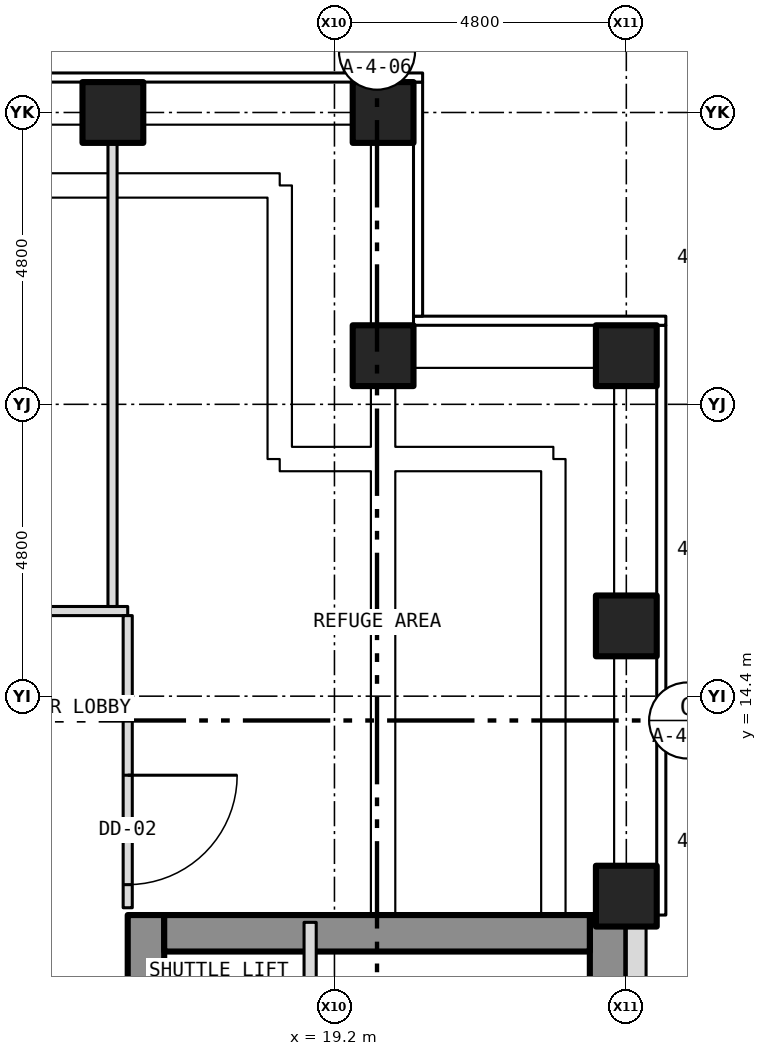
"""IFC4 building model, lengths in metres.
Left out: names, types, materials, properties, quantities, classifications, styles, units other than length and angle.
Written with IfcOpenShell. Run it as: python <this file> out.ifc"""

import sys

from ifc_helpers import new_model, si_unit, direction, frame, frame_2d, origin, origin_2d, place, context, subcontext, project, spatial, rectangle, hollow_rectangle, extrude, element, fill, save


model = new_model("IFC4")
c1 = context("Model", 3, precision=1e-05, world=origin(), true_north=direction((0.0, 1.0)))
c2 = subcontext(c1, "Body", "Model", "MODEL_VIEW")
j1 = project(units=[si_unit("LENGTHUNIT", "METRE"), si_unit("PLANEANGLEUNIT", "RADIAN")], contexts=[c1])
p1 = place(None, origin())
s1 = spatial("IfcSite", under=j1, at=p1, CompositionType="ELEMENT")
p2 = place(p1, origin())
s2 = spatial("IfcBuilding", under=s1, at=p2, CompositionType="ELEMENT")
p3 = place(p2, frame((0.0, 0.0, 84.5)))
s3 = spatial("IfcBuildingStorey", under=s2, at=p3, CompositionType="ELEMENT", Elevation=84.5)
for number, where, z_axis, x_axis in (
    (1, (15.556, 24.0, -0.3), (0.0, 0.0, 1.0), (1.0, 0.0, 0.0)),
    (2, (20.0, 24.0, -0.3), (0.0, 0.0, 1.0), (1.0, 0.0, 0.0)),
    (3, (24.0, 11.111, -0.3), (0.0, 0.0, 1.0), (1.0, 0.0, 0.0)),
    (4, (24.0, 15.556, -0.3), (0.0, 0.0, 1.0), (1.0, 0.0, 0.0)),
    (5, (24.0, 20.0, -0.3), (0.0, 0.0, 1.0), (1.0, 0.0, 0.0)),
    (6, (20.0, 20.0, -0.3), (0.0, 0.0, 1.0), (1.0, 0.0, 0.0)),
):
    element("IfcColumn", number, at=place(p3, frame(where, z_axis=z_axis, x_axis=x_axis)), inside=s3, PredefinedType="COLUMN", context=c2, shape_type="SweptSolid", body=[
        extrude(hollow_rectangle(XDim=1.0, YDim=1.0, WallThickness=0.06, at=origin_2d()), origin(), (0.0, 0.0, 1.0), 4.65),
    ])
p4 = place(p3, frame((16.1, -10.8, 0.0), z_axis=(0.0, 0.0, 1.0), x_axis=(0.0, 1.0, 0.0)))
e7 = element("IfcWall", 7, at=p4, inside=s3, PredefinedType="SHEAR", context=c2, shape_type="SweptSolid", body=[
    extrude(rectangle(XDim=21.6, YDim=0.6, at=frame_2d((10.8, 0.0))), origin(), (0.0, 0.0, 1.0), 3.9),
])
p5 = place(p4, frame((9.4, 0.0, 0.0)))
e8 = element("IfcOpeningElement", 8, at=p5, cuts=e7, PredefinedType="OPENING", context=c2, shape_type="SweptSolid", body=[
    extrude(rectangle(XDim=1.1, YDim=2.1, at=frame_2d((0.55, 1.05))), frame((0.0, 0.312, 0.0), z_axis=(0.0, -1.0, 0.0), x_axis=(1.0, 0.0, 0.0)), (0.0, 0.0, 1.0), 0.624),
])
p6 = place(p4, frame((11.5, 0.0, 0.0)))
e9 = element("IfcOpeningElement", 9, at=p6, cuts=e7, PredefinedType="OPENING", context=c2, shape_type="SweptSolid", body=[
    extrude(rectangle(XDim=1.1, YDim=2.1, at=frame_2d((0.55, 1.05))), frame((0.0, 0.312, 0.0), z_axis=(0.0, -1.0, 0.0), x_axis=(1.0, 0.0, 0.0)), (0.0, 0.0, 1.0), 0.624),
])
p7 = place(p4, frame((13.6, 0.0, 0.0)))
e10 = element("IfcOpeningElement", 10, at=p7, cuts=e7, PredefinedType="OPENING", context=c2, shape_type="SweptSolid", body=[
    extrude(rectangle(XDim=1.1, YDim=2.1, at=frame_2d((0.55, 1.05))), frame((0.0, 0.312, 0.0), z_axis=(0.0, -1.0, 0.0), x_axis=(1.0, 0.0, 0.0)), (0.0, 0.0, 1.0), 0.624),
])
p8 = place(p4, frame((15.7, 0.0, 0.0)))
e11 = element("IfcOpeningElement", 11, at=p8, cuts=e7, PredefinedType="OPENING", context=c2, shape_type="SweptSolid", body=[
    extrude(rectangle(XDim=1.1, YDim=2.1, at=frame_2d((0.55, 1.05))), frame((0.0, 0.312, 0.0), z_axis=(0.0, -1.0, 0.0), x_axis=(1.0, 0.0, 0.0)), (0.0, 0.0, 1.0), 0.624),
])
p9 = place(p4, frame((17.8, 0.0, 0.0)))
e12 = element("IfcOpeningElement", 12, at=p9, cuts=e7, PredefinedType="OPENING", context=c2, shape_type="SweptSolid", body=[
    extrude(rectangle(XDim=1.1, YDim=2.1, at=frame_2d((0.55, 1.05))), frame((0.0, 0.312, 0.0), z_axis=(0.0, -1.0, 0.0), x_axis=(1.0, 0.0, 0.0)), (0.0, 0.0, 1.0), 0.624),
])
p10 = place(p4, frame((5.642, 0.0, 0.0)))
e13 = element("IfcOpeningElement", 13, at=p10, cuts=e7, PredefinedType="OPENING", context=c2, shape_type="SweptSolid", body=[
    extrude(rectangle(XDim=1.1, YDim=2.1, at=frame_2d((0.55, 1.05))), frame((0.0, 0.312, 0.0), z_axis=(0.0, -1.0, 0.0), x_axis=(1.0, 0.0, 0.0)), (0.0, 0.0, 1.0), 0.624),
])
p11 = place(p4, frame((7.5, 0.0, 0.0)))
e14 = element("IfcOpeningElement", 14, at=p11, cuts=e7, PredefinedType="OPENING", context=c2, shape_type="SweptSolid", body=[
    extrude(rectangle(XDim=1.1, YDim=2.1, at=frame_2d((0.55, 1.05))), frame((0.0, 0.312, 0.0), z_axis=(0.0, -1.0, 0.0), x_axis=(1.0, 0.0, 0.0)), (0.0, 0.0, 1.0), 0.624),
])
p12 = place(p3, frame((23.7, -10.8, 0.0), z_axis=(0.0, 0.0, 1.0), x_axis=(0.0, 1.0, 0.0)))
e15 = element("IfcWall", 15, at=p12, inside=s3, PredefinedType="SHEAR", context=c2, shape_type="SweptSolid", body=[
    extrude(rectangle(XDim=21.6, YDim=0.6, at=frame_2d((10.8, 0.0))), origin(), (0.0, 0.0, 1.0), 3.9),
])
p13 = place(p3, frame((16.4, 10.5, 0.0), z_axis=(0.0, 0.0, 1.0), x_axis=(1.0, 0.0, 0.0)))
e16 = element("IfcWall", 16, at=p13, inside=s3, PredefinedType="SHEAR", context=c2, shape_type="SweptSolid", body=[
    extrude(rectangle(XDim=7.0, YDim=0.6, at=frame_2d((3.5, 0.0))), origin(), (0.0, 0.0, 1.0), 3.9),
])
p14 = place(p3, frame((24.163, -10.8, 0.0), z_axis=(0.0, 0.0, 1.0), x_axis=(0.0, 1.0, 0.0)))
e17 = element("IfcWall", 17, at=p14, inside=s3, PredefinedType="SOLIDWALL", context=c2, shape_type="SweptSolid", body=[
    extrude(rectangle(XDim=21.6, YDim=0.325, at=frame_2d((10.8, 0.0))), origin(), (0.0, 0.0, 1.0), 4.5),
])
p15 = place(p14, frame((3.0, 0.0, 2.2)))
e18 = element("IfcOpeningElement", 18, at=p15, cuts=e17, PredefinedType="OPENING", context=c2, shape_type="SweptSolid", body=[
    extrude(rectangle(XDim=1.2, YDim=0.6, at=frame_2d((0.6, 0.3))), frame((0.0, 0.175, 0.0), z_axis=(0.0, -1.0, 0.0), x_axis=(1.0, 0.0, 0.0)), (0.0, 0.0, 1.0), 0.349),
])
p16 = place(p14, frame((7.8, 0.0, 2.2)))
e19 = element("IfcOpeningElement", 19, at=p16, cuts=e17, PredefinedType="OPENING", context=c2, shape_type="SweptSolid", body=[
    extrude(rectangle(XDim=1.2, YDim=0.6, at=frame_2d((0.6, 0.3))), frame((0.0, 0.175, 0.0), z_axis=(0.0, -1.0, 0.0), x_axis=(1.0, 0.0, 0.0)), (0.0, 0.0, 1.0), 0.349),
])
p17 = place(p14, frame((12.6, 0.0, 2.2)))
e20 = element("IfcOpeningElement", 20, at=p17, cuts=e17, PredefinedType="OPENING", context=c2, shape_type="SweptSolid", body=[
    extrude(rectangle(XDim=1.2, YDim=0.6, at=frame_2d((0.6, 0.3))), frame((0.0, 0.175, 0.0), z_axis=(0.0, -1.0, 0.0), x_axis=(1.0, 0.0, 0.0)), (0.0, 0.0, 1.0), 0.349),
])
p18 = place(p14, frame((17.4, 0.0, 2.2)))
e21 = element("IfcOpeningElement", 21, at=p18, cuts=e17, PredefinedType="OPENING", context=c2, shape_type="SweptSolid", body=[
    extrude(rectangle(XDim=1.2, YDim=0.6, at=frame_2d((0.6, 0.3))), frame((0.0, 0.175, 0.0), z_axis=(0.0, -1.0, 0.0), x_axis=(1.0, 0.0, 0.0)), (0.0, 0.0, 1.0), 0.349),
])
p19 = place(p3, frame((-15.8, 15.8, 0.0), z_axis=(0.0, 0.0, 1.0), x_axis=(1.0, 0.0, 0.0)))
e22 = element("IfcWall", 22, at=p19, inside=s3, PredefinedType="PARTITIONING", context=c2, shape_type="SweptSolid", body=[
    extrude(rectangle(XDim=31.6, YDim=0.15, at=frame_2d((15.8, 0.0))), origin(), (0.0, 0.0, 1.0), 4.35),
])
p20 = place(p19, frame((4.98, 0.0, 0.0)))
e23 = element("IfcOpeningElement", 23, at=p20, cuts=e22, PredefinedType="OPENING", context=c2, shape_type="SweptSolid", body=[
    extrude(rectangle(XDim=0.9, YDim=2.1, at=frame_2d((0.45, 1.05))), frame((0.0, 0.087, 0.0), z_axis=(0.0, -1.0, 0.0), x_axis=(1.0, 0.0, 0.0)), (0.0, 0.0, 1.0), 0.174),
])
p21 = place(p19, frame((15.35, 0.0, 0.0)))
e24 = element("IfcOpeningElement", 24, at=p21, cuts=e22, PredefinedType="OPENING", context=c2, shape_type="SweptSolid", body=[
    extrude(rectangle(XDim=0.9, YDim=2.1, at=frame_2d((0.45, 1.05))), frame((0.0, 0.087, 0.0), z_axis=(0.0, -1.0, 0.0), x_axis=(1.0, 0.0, 0.0)), (0.0, 0.0, 1.0), 0.174),
])
p22 = place(p19, frame((25.721, 0.0, 0.0)))
e25 = element("IfcOpeningElement", 25, at=p22, cuts=e22, PredefinedType="OPENING", context=c2, shape_type="SweptSolid", body=[
    extrude(rectangle(XDim=0.9, YDim=2.1, at=frame_2d((0.45, 1.05))), frame((0.0, 0.087, 0.0), z_axis=(0.0, -1.0, 0.0), x_axis=(1.0, 0.0, 0.0)), (0.0, 0.0, 1.0), 0.174),
])
p23 = place(p3, frame((15.55, 15.875, 0.0), z_axis=(0.0, 0.0, 1.0), x_axis=(0.0, 1.0, 0.0)))
e26 = element("IfcWall", 26, at=p23, inside=s3, PredefinedType="PARTITIONING", context=c2, shape_type="SweptSolid", body=[
    extrude(rectangle(XDim=8.005, YDim=0.15, at=frame_2d((4.002, 0.0))), origin(), (0.0, 0.0, 1.0), 4.35),
])
p24 = place(p3, frame((15.8, 10.92, 0.0), z_axis=(0.0, 0.0, 1.0), x_axis=(0.0, 1.0, 0.0)))
e27 = element("IfcWall", 27, at=p24, inside=s3, PredefinedType="PARTITIONING", context=c2, shape_type="SweptSolid", body=[
    extrude(rectangle(XDim=4.805, YDim=0.15, at=frame_2d((2.403, 0.0))), origin(), (0.0, 0.0, 1.0), 4.35),
])
p25 = place(p24, frame((0.38, 0.0, 0.0)))
e28 = element("IfcOpeningElement", 28, at=p25, cuts=e27, PredefinedType="OPENING", context=c2, shape_type="SweptSolid", body=[
    extrude(rectangle(XDim=1.8, YDim=2.1, at=frame_2d((0.9, 1.05))), frame((0.0, 0.087, 0.0), z_axis=(0.0, -1.0, 0.0), x_axis=(1.0, 0.0, 0.0)), (0.0, 0.0, 1.0), 0.174),
])
p26 = place(p3, frame((18.8, -1.8, 0.0), z_axis=(0.0, 0.0, 1.0), x_axis=(0.0, 1.0, 0.0)))
e29 = element("IfcWall", 29, at=p26, inside=s3, PredefinedType="PARTITIONING", context=c2, shape_type="SweptSolid", body=[
    extrude(rectangle(XDim=12.48, YDim=0.2, at=frame_2d((6.24, 0.0))), origin(), (0.0, 0.0, 1.0), 3.9),
])
p27 = place(p25, origin())
e30 = element("IfcDoor", 30, at=p27, inside=s3, OperationType="DOUBLE_DOOR_SINGLE_SWING", PredefinedType="DOOR", context=c2, shape_type="SweptSolid", body=[
    extrude(rectangle(XDim=1.8, YDim=2.1, at=frame_2d((0.9, 1.05))), frame((0.0, 0.025, 0.0), z_axis=(0.0, -1.0, 0.0), x_axis=(1.0, 0.0, 0.0)), (0.0, 0.0, 1.0), 0.05),
])
fill(e28, e30)
save(model, sys.argv[1])
